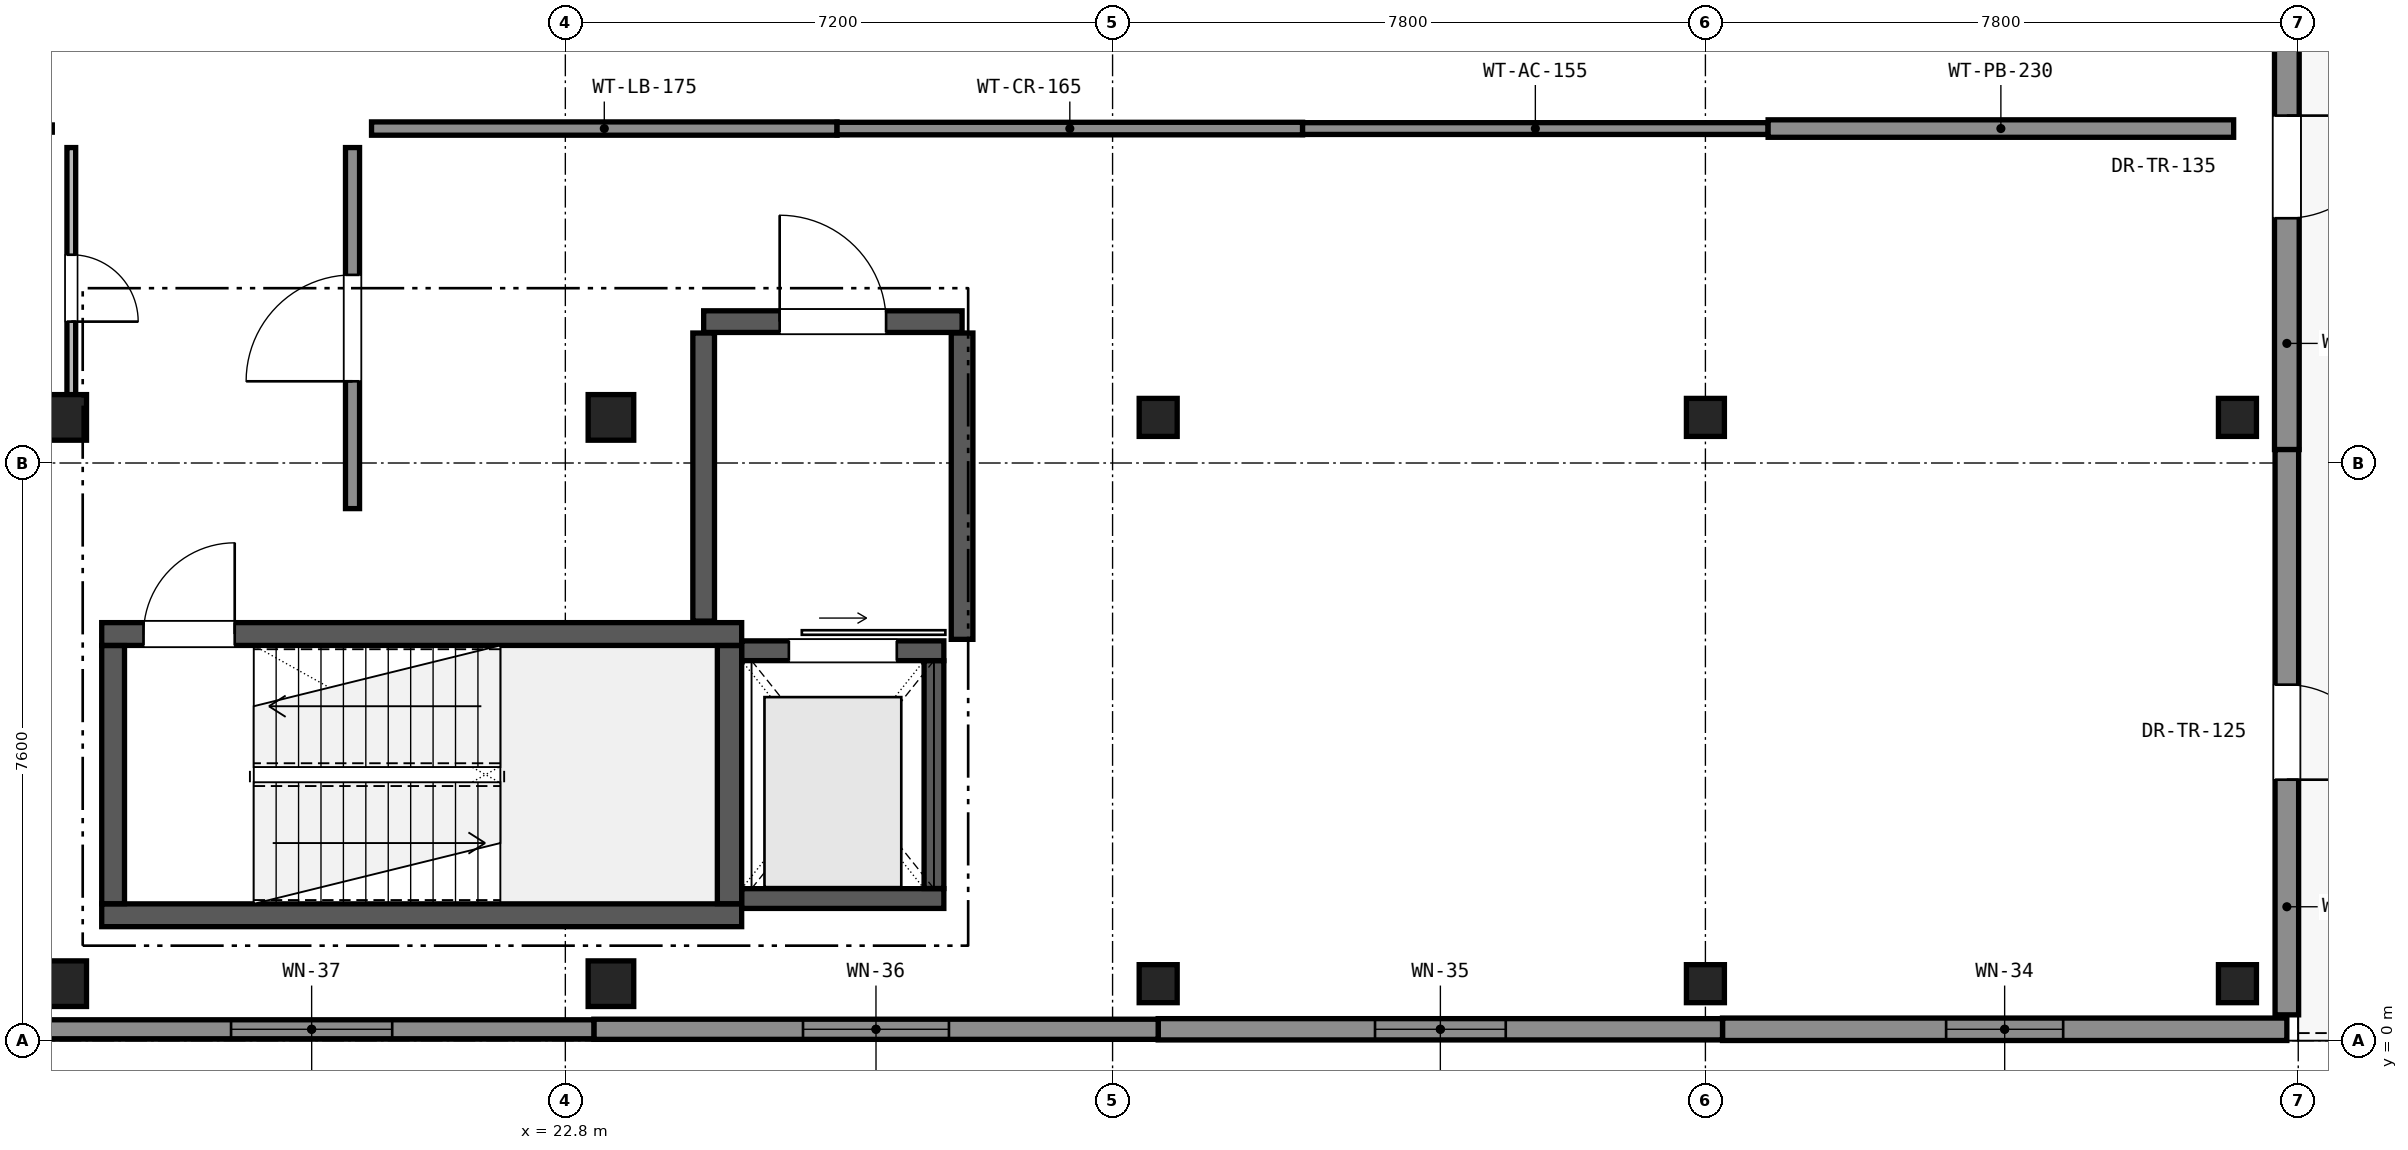
"""IFC4 building model, lengths in metres.
Left out: names, types, materials, properties, quantities, classifications, styles, units other than length and angle.
Written with IfcOpenShell. Run it as: python <this file> out.ifc"""

import sys

from ifc_helpers import new_model, si_unit, direction, frame, frame_2d, origin, origin_2d, place, context, subcontext, project, spatial, rectangle, extrude, element, fill, save


model = new_model("IFC4")
c1 = context("Model", 3, precision=1e-05, world=origin(), true_north=direction((0.0, 1.0)))
c2 = subcontext(c1, "Body", "Model", "MODEL_VIEW")
j1 = project(units=[si_unit("LENGTHUNIT", "METRE"), si_unit("PLANEANGLEUNIT", "RADIAN")], contexts=[c1])
p1 = place(None, origin())
s1 = spatial("IfcSite", under=j1, at=p1, CompositionType="ELEMENT")
p2 = place(p1, origin())
s2 = spatial("IfcBuilding", under=s1, at=p2, CompositionType="ELEMENT")
p3 = place(p2, frame((0.0, 0.0, 17.68)))
s3 = spatial("IfcBuildingStorey", under=s2, at=p3, CompositionType="ELEMENT", Elevation=17.68)
for number, where, z_axis, x_axis in (
    (1, (16.2, 0.75, 0.0), (0.0, 0.0, 1.0), (1.0, 0.0, 0.0)),
    (2, (16.2, 8.2, 0.0), (0.0, 0.0, 1.0), (1.0, 0.0, 0.0)),
    (3, (23.4, 0.75, 0.0), (0.0, 0.0, 1.0), (1.0, 0.0, 0.0)),
    (4, (23.4, 8.2, 0.0), (0.0, 0.0, 1.0), (1.0, 0.0, 0.0)),
):
    element("IfcColumn", number, at=place(p3, frame(where, z_axis=z_axis, x_axis=x_axis)), inside=s3, PredefinedType="COLUMN", context=c2, shape_type="SweptSolid", body=[
        extrude(rectangle(XDim=0.6, YDim=0.6, at=origin_2d()), origin(), (0.0, 0.0, 1.0), 4.08),
    ])
for number, where, z_axis, x_axis in (
    (5, (30.6, 0.75, 0.0), (0.0, 0.0, 1.0), (1.0, 0.0, 0.0)),
    (6, (30.6, 8.2, 0.0), (0.0, 0.0, 1.0), (1.0, 0.0, 0.0)),
    (7, (37.8, 0.75, 0.0), (0.0, 0.0, 1.0), (1.0, 0.0, 0.0)),
    (8, (37.8, 8.2, 0.0), (0.0, 0.0, 1.0), (1.0, 0.0, 0.0)),
    (9, (44.8, 0.75, 0.0), (0.0, 0.0, 1.0), (1.0, 0.0, 0.0)),
    (10, (44.8, 8.2, 0.0), (0.0, 0.0, 1.0), (1.0, 0.0, 0.0)),
):
    element("IfcColumn", number, at=place(p3, frame(where, z_axis=z_axis, x_axis=x_axis)), inside=s3, PredefinedType="COLUMN", context=c2, shape_type="SweptSolid", body=[
        extrude(rectangle(XDim=0.5, YDim=0.5, at=origin_2d()), origin(), (0.0, 0.0, 1.0), 4.08),
    ])
p4 = place(p3, frame((45.45, 15.213, 0.0), z_axis=(0.0, 0.0, 1.0), x_axis=(0.0, -1.0, 0.0)))
e11 = element("IfcWall", 11, at=p4, inside=s3, PredefinedType="SOLIDWALL", context=c2, shape_type="SweptSolid", body=[
    extrude(rectangle(XDim=7.437, YDim=0.325, at=frame_2d((3.718, 0.0))), origin(), (0.0, 0.0, 1.0), 3.72),
])
p5 = place(p4, frame((3.043, 0.0, 0.0)))
e12 = element("IfcOpeningElement", 12, at=p5, cuts=e11, PredefinedType="OPENING", context=c2, shape_type="SweptSolid", body=[
    extrude(rectangle(XDim=1.35, YDim=2.2, at=frame_2d((0.675, 1.1))), frame((0.0, 0.172, 0.0), z_axis=(0.0, -1.0, 0.0), x_axis=(1.0, 0.0, 0.0)), (0.0, 0.0, 1.0), 0.345),
])
p6 = place(p3, frame((45.45, 7.777, 0.0), z_axis=(0.0, 0.0, 1.0), x_axis=(0.0, -1.0, 0.0)))
e13 = element("IfcWall", 13, at=p6, inside=s3, PredefinedType="SOLIDWALL", context=c2, shape_type="SweptSolid", body=[
    extrude(rectangle(XDim=7.437, YDim=0.31, at=frame_2d((3.718, 0.0))), origin(), (0.0, 0.0, 1.0), 3.72),
])
p7 = place(p6, frame((3.093, 0.0, 0.0)))
e14 = element("IfcOpeningElement", 14, at=p7, cuts=e13, PredefinedType="OPENING", context=c2, shape_type="SweptSolid", body=[
    extrude(rectangle(XDim=1.25, YDim=2.15, at=frame_2d((0.625, 1.075))), frame((0.0, 0.165, 0.0), z_axis=(0.0, -1.0, 0.0), x_axis=(1.0, 0.0, 0.0)), (0.0, 0.0, 1.0), 0.33),
])
p8 = place(p3, frame((45.45, 0.15, 0.0), z_axis=(0.0, 0.0, 1.0), x_axis=(-1.0, 0.0, 0.0)))
e15 = element("IfcWall", 15, at=p8, inside=s3, PredefinedType="SOLIDWALL", context=c2, shape_type="SweptSolid", body=[
    extrude(rectangle(XDim=7.425, YDim=0.295, at=frame_2d((3.712, 0.0))), origin(), (0.0, 0.0, 1.0), 3.72),
])
p9 = place(p8, frame((2.943, 0.0, 0.9)))
e16 = element("IfcOpeningElement", 16, at=p9, cuts=e15, PredefinedType="OPENING", context=c2, shape_type="SweptSolid", body=[
    extrude(rectangle(XDim=1.54, YDim=1.62, at=frame_2d((0.77, 0.81))), frame((0.0, 0.157, 0.0), z_axis=(0.0, -1.0, 0.0), x_axis=(1.0, 0.0, 0.0)), (0.0, 0.0, 1.0), 0.315),
])
p10 = place(p3, frame((38.025, 0.15, 0.0), z_axis=(0.0, 0.0, 1.0), x_axis=(-1.0, 0.0, 0.0)))
e17 = element("IfcWall", 17, at=p10, inside=s3, PredefinedType="SOLIDWALL", context=c2, shape_type="SweptSolid", body=[
    extrude(rectangle(XDim=7.425, YDim=0.28, at=frame_2d((3.712, 0.0))), origin(), (0.0, 0.0, 1.0), 3.72),
])
p11 = place(p10, frame((2.852, 0.0, 0.9)))
e18 = element("IfcOpeningElement", 18, at=p11, cuts=e17, PredefinedType="OPENING", context=c2, shape_type="SweptSolid", body=[
    extrude(rectangle(XDim=1.72, YDim=1.62, at=frame_2d((0.86, 0.81))), frame((0.0, 0.15, 0.0), z_axis=(0.0, -1.0, 0.0), x_axis=(1.0, 0.0, 0.0)), (0.0, 0.0, 1.0), 0.3),
])
p12 = place(p3, frame((30.6, 0.15, 0.0), z_axis=(0.0, 0.0, 1.0), x_axis=(-1.0, 0.0, 0.0)))
e19 = element("IfcWall", 19, at=p12, inside=s3, PredefinedType="SOLIDWALL", context=c2, shape_type="SweptSolid", body=[
    extrude(rectangle(XDim=7.425, YDim=0.265, at=frame_2d((3.712, 0.0))), origin(), (0.0, 0.0, 1.0), 3.72),
])
p13 = place(p12, frame((2.753, 0.0, 0.9)))
e20 = element("IfcOpeningElement", 20, at=p13, cuts=e19, PredefinedType="OPENING", context=c2, shape_type="SweptSolid", body=[
    extrude(rectangle(XDim=1.92, YDim=1.62, at=frame_2d((0.96, 0.81))), frame((0.0, 0.142, 0.0), z_axis=(0.0, -1.0, 0.0), x_axis=(1.0, 0.0, 0.0)), (0.0, 0.0, 1.0), 0.285),
])
p14 = place(p3, frame((23.175, 0.15, 0.0), z_axis=(0.0, 0.0, 1.0), x_axis=(-1.0, 0.0, 0.0)))
e21 = element("IfcWall", 21, at=p14, inside=s3, PredefinedType="SOLIDWALL", context=c2, shape_type="SweptSolid", body=[
    extrude(rectangle(XDim=7.425, YDim=0.25, at=frame_2d((3.712, 0.0))), origin(), (0.0, 0.0, 1.0), 3.72),
])
p15 = place(p14, frame((2.653, 0.0, 0.9)))
e22 = element("IfcOpeningElement", 22, at=p15, cuts=e21, PredefinedType="OPENING", context=c2, shape_type="SweptSolid", body=[
    extrude(rectangle(XDim=2.12, YDim=1.62, at=frame_2d((1.06, 0.81))), frame((0.0, 0.135, 0.0), z_axis=(0.0, -1.0, 0.0), x_axis=(1.0, 0.0, 0.0)), (0.0, 0.0, 1.0), 0.27),
])
p16 = place(p3, frame((16.7, 1.65, 0.0), z_axis=(0.0, 0.0, 1.0), x_axis=(1.0, 0.0, 0.0)))
e23 = element("IfcWall", 23, at=p16, inside=s3, PredefinedType="SHEAR", context=c2, shape_type="SweptSolid", body=[
    extrude(rectangle(XDim=8.42, YDim=0.3, at=frame_2d((4.21, 0.0))), origin(), (0.0, 0.0, 1.0), 3.72),
])
p17 = place(p3, frame((16.7, 5.35, 0.0), z_axis=(0.0, 0.0, 1.0), x_axis=(1.0, 0.0, 0.0)))
e24 = element("IfcWall", 24, at=p17, inside=s3, PredefinedType="SHEAR", context=c2, shape_type="SweptSolid", body=[
    extrude(rectangle(XDim=8.42, YDim=0.3, at=frame_2d((4.21, 0.0))), origin(), (0.0, 0.0, 1.0), 3.72),
])
p18 = place(p17, frame((0.55, 0.0, 0.0)))
e25 = element("IfcOpeningElement", 25, at=p18, cuts=e24, PredefinedType="OPENING", context=c2, shape_type="SweptSolid", body=[
    extrude(rectangle(XDim=1.2, YDim=2.2, at=frame_2d((0.6, 1.1))), frame((0.0, 0.16, 0.0), z_axis=(0.0, -1.0, 0.0), x_axis=(1.0, 0.0, 0.0)), (0.0, 0.0, 1.0), 0.32),
])
p19 = place(p3, frame((16.85, 1.802, 0.0), z_axis=(0.0, 0.0, 1.0), x_axis=(0.0, 1.0, 0.0)))
e26 = element("IfcWall", 26, at=p19, inside=s3, PredefinedType="SHEAR", context=c2, shape_type="SweptSolid", body=[
    extrude(rectangle(XDim=3.396, YDim=0.3, at=frame_2d((1.698, 0.0))), origin(), (0.0, 0.0, 1.0), 3.72),
])
p20 = place(p3, frame((24.96, 1.802, 0.0), z_axis=(0.0, 0.0, 1.0), x_axis=(0.0, 1.0, 0.0)))
e27 = element("IfcWall", 27, at=p20, inside=s3, PredefinedType="SHEAR", context=c2, shape_type="SweptSolid", body=[
    extrude(rectangle(XDim=3.396, YDim=0.32, at=frame_2d((1.698, 0.0))), origin(), (0.0, 0.0, 1.0), 3.72),
])
p21 = place(p3, frame((25.122, 1.87, 0.0), z_axis=(0.0, 0.0, 1.0), x_axis=(1.0, 0.0, 0.0)))
e28 = element("IfcWall", 28, at=p21, inside=s3, PredefinedType="SHEAR", context=c2, shape_type="SweptSolid", body=[
    extrude(rectangle(XDim=2.658, YDim=0.26, at=frame_2d((1.329, 0.0))), origin(), (0.0, 0.0, 1.0), 3.72),
])
p22 = place(p3, frame((25.122, 5.13, 0.0), z_axis=(0.0, 0.0, 1.0), x_axis=(1.0, 0.0, 0.0)))
e29 = element("IfcWall", 29, at=p22, inside=s3, PredefinedType="SHEAR", context=c2, shape_type="SweptSolid", body=[
    extrude(rectangle(XDim=2.658, YDim=0.26, at=frame_2d((1.329, 0.0))), origin(), (0.0, 0.0, 1.0), 3.72),
])
p23 = place(p22, frame((0.619, 0.0, 0.0)))
e30 = element("IfcOpeningElement", 30, at=p23, cuts=e29, PredefinedType="OPENING", context=c2, shape_type="SweptSolid", body=[
    extrude(rectangle(XDim=1.42, YDim=2.25, at=frame_2d((0.71, 1.125))), frame((0.0, 0.14, 0.0), z_axis=(0.0, -1.0, 0.0), x_axis=(1.0, 0.0, 0.0)), (0.0, 0.0, 1.0), 0.28),
])
p24 = place(p3, frame((27.65, 2.002, 0.0), z_axis=(0.0, 0.0, 1.0), x_axis=(0.0, 1.0, 0.0)))
e31 = element("IfcWall", 31, at=p24, inside=s3, PredefinedType="SHEAR", context=c2, shape_type="SweptSolid", body=[
    extrude(rectangle(XDim=2.996, YDim=0.26, at=frame_2d((1.498, 0.0))), origin(), (0.0, 0.0, 1.0), 3.72),
])
p25 = place(p3, frame((24.62, 9.46, 0.0), z_axis=(0.0, 0.0, 1.0), x_axis=(1.0, 0.0, 0.0)))
e32 = element("IfcWall", 32, at=p25, inside=s3, PredefinedType="SHEAR", context=c2, shape_type="SweptSolid", body=[
    extrude(rectangle(XDim=3.4, YDim=0.285, at=frame_2d((1.7, 0.0))), origin(), (0.0, 0.0, 1.0), 3.72),
])
p26 = place(p25, frame((1.0, 0.0, 0.0)))
e33 = element("IfcOpeningElement", 33, at=p26, cuts=e32, PredefinedType="OPENING", context=c2, shape_type="SweptSolid", body=[
    extrude(rectangle(XDim=1.4, YDim=2.25, at=frame_2d((0.7, 1.125))), frame((0.0, 0.152, 0.0), z_axis=(0.0, -1.0, 0.0), x_axis=(1.0, 0.0, 0.0)), (0.0, 0.0, 1.0), 0.305),
])
p27 = place(p3, frame((24.62, 5.52, 0.0), z_axis=(0.0, 0.0, 1.0), x_axis=(0.0, 1.0, 0.0)))
e34 = element("IfcWall", 34, at=p27, inside=s3, PredefinedType="SHEAR", context=c2, shape_type="SweptSolid", body=[
    extrude(rectangle(XDim=3.79, YDim=0.285, at=frame_2d((1.895, 0.0))), origin(), (0.0, 0.0, 1.0), 2.77),
])
p28 = place(p3, frame((28.02, 5.28, 0.0), z_axis=(0.0, 0.0, 1.0), x_axis=(0.0, 1.0, 0.0)))
e35 = element("IfcWall", 35, at=p28, inside=s3, PredefinedType="SHEAR", context=c2, shape_type="SweptSolid", body=[
    extrude(rectangle(XDim=4.03, YDim=0.285, at=frame_2d((2.015, 0.0))), origin(), (0.0, 0.0, 1.0), 2.77),
])
p29 = place(p3, frame((20.0, 7.0, 0.0), z_axis=(0.0, 0.0, 1.0), x_axis=(0.0, 1.0, 0.0)))
e36 = element("IfcWall", 36, at=p29, inside=s3, PredefinedType="PARTITIONING", context=c2, shape_type="SweptSolid", body=[
    extrude(rectangle(XDim=4.75, YDim=0.185, at=frame_2d((2.375, 0.0))), origin(), (0.0, 0.0, 1.0), 2.77),
])
p30 = place(p29, frame((1.675, 0.0, 0.0)))
e37 = element("IfcOpeningElement", 37, at=p30, cuts=e36, PredefinedType="OPENING", context=c2, shape_type="SweptSolid", body=[
    extrude(rectangle(XDim=1.4, YDim=2.2, at=frame_2d((0.7, 1.1))), frame((0.0, 0.103, 0.0), z_axis=(0.0, -1.0, 0.0), x_axis=(1.0, 0.0, 0.0)), (0.0, 0.0, 1.0), 0.205),
])
p31 = place(p3, frame((20.25, 12.0, 0.0), z_axis=(0.0, 0.0, 1.0), x_axis=(1.0, 0.0, 0.0)))
e38 = element("IfcWall", 38, at=p31, inside=s3, PredefinedType="PARTITIONING", context=c2, shape_type="SweptSolid", body=[
    extrude(rectangle(XDim=6.125, YDim=0.175, at=frame_2d((3.062, 0.0))), origin(), (0.0, 0.0, 1.0), 2.92),
])
p32 = place(p3, frame((26.375, 12.0, 0.0), z_axis=(0.0, 0.0, 1.0), x_axis=(1.0, 0.0, 0.0)))
e39 = element("IfcWall", 39, at=p32, inside=s3, PredefinedType="PARTITIONING", context=c2, shape_type="SweptSolid", body=[
    extrude(rectangle(XDim=6.125, YDim=0.165, at=frame_2d((3.062, 0.0))), origin(), (0.0, 0.0, 1.0), 3.07),
])
p33 = place(p3, frame((32.5, 12.0, 0.0), z_axis=(0.0, 0.0, 1.0), x_axis=(1.0, 0.0, 0.0)))
e40 = element("IfcWall", 40, at=p33, inside=s3, PredefinedType="PARTITIONING", context=c2, shape_type="SweptSolid", body=[
    extrude(rectangle(XDim=6.125, YDim=0.155, at=frame_2d((3.062, 0.0))), origin(), (0.0, 0.0, 1.0), 2.97),
])
p34 = place(p3, frame((38.625, 12.0, 0.0), z_axis=(0.0, 0.0, 1.0), x_axis=(1.0, 0.0, 0.0)))
e41 = element("IfcWall", 41, at=p34, inside=s3, PredefinedType="PARTITIONING", context=c2, shape_type="SweptSolid", body=[
    extrude(rectangle(XDim=6.125, YDim=0.23, at=frame_2d((3.062, 0.0))), origin(), (0.0, 0.0, 1.0), 3.17),
])
p35 = place(p3, frame((16.3, 11.75, 0.0), z_axis=(0.0, 0.0, 1.0), x_axis=(0.0, -1.0, 0.0)))
e42 = element("IfcWall", 42, at=p35, inside=s3, PredefinedType="PARTITIONING", context=c2, shape_type="SweptSolid", body=[
    extrude(rectangle(XDim=3.7, YDim=0.115, at=frame_2d((1.85, 0.0))), origin(), (0.0, 0.0, 1.0), 2.77),
])
p36 = place(p35, frame((1.41, 0.0, 0.0)))
e43 = element("IfcOpeningElement", 43, at=p36, cuts=e42, PredefinedType="OPENING", context=c2, shape_type="SweptSolid", body=[
    extrude(rectangle(XDim=0.88, YDim=2.1, at=frame_2d((0.44, 1.05))), frame((0.0, 0.067, 0.0), z_axis=(0.0, -1.0, 0.0), x_axis=(1.0, 0.0, 0.0)), (0.0, 0.0, 1.0), 0.135),
])
p37 = place(p5, origin())
e44 = element("IfcDoor", 44, at=p37, inside=s3, OperationType="SINGLE_SWING_LEFT", PredefinedType="DOOR", context=c2, shape_type="SweptSolid", body=[
    extrude(rectangle(XDim=1.35, YDim=2.2, at=frame_2d((0.675, 1.1))), frame((0.0, 0.025, 0.0), z_axis=(0.0, -1.0, 0.0), x_axis=(1.0, 0.0, 0.0)), (0.0, 0.0, 1.0), 0.05),
])
fill(e12, e44)
p38 = place(p7, origin())
e45 = element("IfcDoor", 45, at=p38, inside=s3, OperationType="SINGLE_SWING_RIGHT", PredefinedType="DOOR", context=c2, shape_type="SweptSolid", body=[
    extrude(rectangle(XDim=1.25, YDim=2.15, at=frame_2d((0.625, 1.075))), frame((0.0, 0.025, 0.0), z_axis=(0.0, -1.0, 0.0), x_axis=(1.0, 0.0, 0.0)), (0.0, 0.0, 1.0), 0.05),
])
fill(e14, e45)
p39 = place(p9, origin())
e46 = element("IfcWindow", 46, at=p39, inside=s3, PartitioningType="SINGLE_PANEL", PredefinedType="WINDOW", context=c2, shape_type="SweptSolid", body=[
    extrude(rectangle(XDim=1.54, YDim=1.62, at=frame_2d((0.77, 0.81))), frame((0.0, 0.03, 0.0), z_axis=(0.0, -1.0, 0.0), x_axis=(1.0, 0.0, 0.0)), (0.0, 0.0, 1.0), 0.06),
])
fill(e16, e46)
p40 = place(p11, origin())
e47 = element("IfcWindow", 47, at=p40, inside=s3, PartitioningType="SINGLE_PANEL", PredefinedType="WINDOW", context=c2, shape_type="SweptSolid", body=[
    extrude(rectangle(XDim=1.72, YDim=1.62, at=frame_2d((0.86, 0.81))), frame((0.0, 0.03, 0.0), z_axis=(0.0, -1.0, 0.0), x_axis=(1.0, 0.0, 0.0)), (0.0, 0.0, 1.0), 0.06),
])
fill(e18, e47)
p41 = place(p13, origin())
e48 = element("IfcWindow", 48, at=p41, inside=s3, PartitioningType="SINGLE_PANEL", PredefinedType="WINDOW", context=c2, shape_type="SweptSolid", body=[
    extrude(rectangle(XDim=1.92, YDim=1.62, at=frame_2d((0.96, 0.81))), frame((0.0, 0.03, 0.0), z_axis=(0.0, -1.0, 0.0), x_axis=(1.0, 0.0, 0.0)), (0.0, 0.0, 1.0), 0.06),
])
fill(e20, e48)
p42 = place(p15, origin())
e49 = element("IfcWindow", 49, at=p42, inside=s3, PartitioningType="SINGLE_PANEL", PredefinedType="WINDOW", context=c2, shape_type="SweptSolid", body=[
    extrude(rectangle(XDim=2.12, YDim=1.62, at=frame_2d((1.06, 0.81))), frame((0.0, 0.03, 0.0), z_axis=(0.0, -1.0, 0.0), x_axis=(1.0, 0.0, 0.0)), (0.0, 0.0, 1.0), 0.06),
])
fill(e22, e49)
p43 = place(p18, origin())
e50 = element("IfcDoor", 50, at=p43, inside=s3, OperationType="SINGLE_SWING_RIGHT", PredefinedType="DOOR", context=c2, shape_type="SweptSolid", body=[
    extrude(rectangle(XDim=1.2, YDim=2.2, at=frame_2d((0.6, 1.1))), frame((0.0, 0.025, 0.0), z_axis=(0.0, -1.0, 0.0), x_axis=(1.0, 0.0, 0.0)), (0.0, 0.0, 1.0), 0.05),
])
fill(e25, e50)
p44 = place(p23, origin())
e51 = element("IfcDoor", 51, at=p44, inside=s3, OperationType="SLIDING_TO_RIGHT", PredefinedType="DOOR", context=c2, shape_type="SweptSolid", body=[
    extrude(rectangle(XDim=1.42, YDim=2.25, at=frame_2d((0.71, 1.125))), frame((0.0, 0.025, 0.0), z_axis=(0.0, -1.0, 0.0), x_axis=(1.0, 0.0, 0.0)), (0.0, 0.0, 1.0), 0.05),
])
fill(e30, e51)
p45 = place(p26, origin())
e52 = element("IfcDoor", 52, at=p45, inside=s3, OperationType="SINGLE_SWING_LEFT", PredefinedType="DOOR", context=c2, shape_type="SweptSolid", body=[
    extrude(rectangle(XDim=1.4, YDim=2.25, at=frame_2d((0.7, 1.125))), frame((0.0, 0.025, 0.0), z_axis=(0.0, -1.0, 0.0), x_axis=(1.0, 0.0, 0.0)), (0.0, 0.0, 1.0), 0.05),
])
fill(e33, e52)
p46 = place(p30, origin())
e53 = element("IfcDoor", 53, at=p46, inside=s3, OperationType="SINGLE_SWING_LEFT", PredefinedType="DOOR", context=c2, shape_type="SweptSolid", body=[
    extrude(rectangle(XDim=1.4, YDim=2.2, at=frame_2d((0.7, 1.1))), frame((0.0, 0.025, 0.0), z_axis=(0.0, -1.0, 0.0), x_axis=(1.0, 0.0, 0.0)), (0.0, 0.0, 1.0), 0.05),
])
fill(e37, e53)
p47 = place(p36, origin())
e54 = element("IfcDoor", 54, at=p47, inside=s3, OperationType="SINGLE_SWING_RIGHT", PredefinedType="DOOR", context=c2, shape_type="SweptSolid", body=[
    extrude(rectangle(XDim=0.88, YDim=2.1, at=frame_2d((0.44, 1.05))), frame((0.0, 0.025, 0.0), z_axis=(0.0, -1.0, 0.0), x_axis=(1.0, 0.0, 0.0)), (0.0, 0.0, 1.0), 0.05),
])
fill(e43, e54)
save(model, sys.argv[1])
